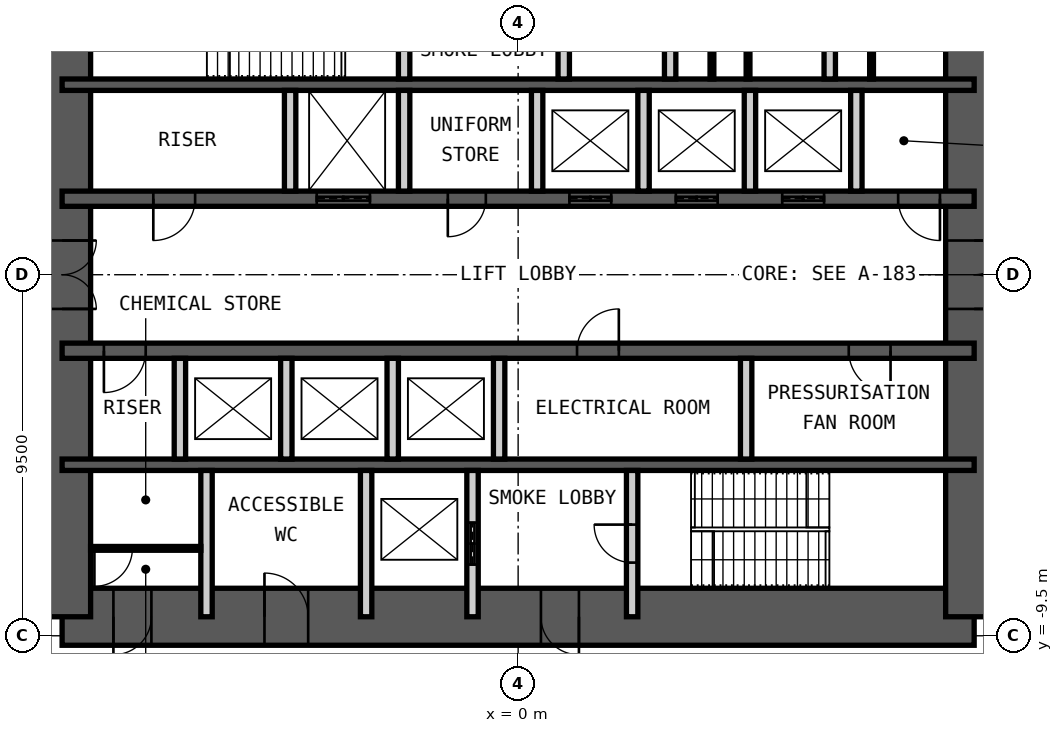
"""IFC4 building model, lengths in metres.
Left out: names, types, materials, properties, quantities, classifications, styles, units other than length and angle.
Written with IfcOpenShell. Run it as: python <this file> out.ifc"""

import sys

from ifc_helpers import new_model, si_unit, direction, frame, frame_2d, origin, place, context, subcontext, project, spatial, rectangle, extrude, element, fill, save


model = new_model("IFC4")
c1 = context("Model", 3, precision=1e-05, world=origin(), true_north=direction((0.0, 1.0)))
c2 = subcontext(c1, "Body", "Model", "MODEL_VIEW")
j1 = project(units=[si_unit("LENGTHUNIT", "METRE"), si_unit("PLANEANGLEUNIT", "RADIAN")], contexts=[c1])
p1 = place(None, origin())
s1 = spatial("IfcSite", under=j1, at=p1, CompositionType="ELEMENT")
p2 = place(p1, origin())
s2 = spatial("IfcBuilding", under=s1, at=p2, CompositionType="ELEMENT")
p3 = place(p2, frame((0.0, 0.0, 72.0)))
s3 = spatial("IfcBuildingStorey", under=s2, at=p3, CompositionType="ELEMENT", Elevation=72.0)
p4 = place(p3, frame((-12.0, -9.0, 0.0), z_axis=(0.0, 0.0, 1.0), x_axis=(1.0, 0.0, 0.0)))
e1 = element("IfcWall", 1, at=p4, inside=s3, PredefinedType="SHEAR", context=c2, shape_type="SweptSolid", body=[
    extrude(rectangle(XDim=24.0, YDim=1.5, at=frame_2d((12.0, 0.0))), origin(), (0.0, 0.0, 1.0), 5.0),
])
p5 = place(p4, frame((1.35, 0.0, 0.0)))
e2 = element("IfcOpeningElement", 2, at=p5, cuts=e1, PredefinedType="OPENING", context=c2, shape_type="SweptSolid", body=[
    extrude(rectangle(XDim=1.0, YDim=2.1, at=frame_2d((0.5, 1.05))), frame((0.0, 0.76, 0.0), z_axis=(0.0, -1.0, 0.0), x_axis=(1.0, 0.0, 0.0)), (0.0, 0.0, 1.0), 1.52),
])
p6 = place(p4, frame((5.325, 0.0, 0.0)))
e3 = element("IfcOpeningElement", 3, at=p6, cuts=e1, PredefinedType="OPENING", context=c2, shape_type="SweptSolid", body=[
    extrude(rectangle(XDim=1.15, YDim=2.1, at=frame_2d((0.575, 1.05))), frame((0.0, 0.76, 0.0), z_axis=(0.0, -1.0, 0.0), x_axis=(1.0, 0.0, 0.0)), (0.0, 0.0, 1.0), 1.52),
])
p7 = place(p4, frame((12.6, 0.0, 0.0)))
e4 = element("IfcOpeningElement", 4, at=p7, cuts=e1, PredefinedType="OPENING", context=c2, shape_type="SweptSolid", body=[
    extrude(rectangle(XDim=1.0, YDim=2.1, at=frame_2d((0.5, 1.05))), frame((0.0, 0.76, 0.0), z_axis=(0.0, -1.0, 0.0), x_axis=(1.0, 0.0, 0.0)), (0.0, 0.0, 1.0), 1.52),
])
p8 = place(p3, frame((12.0, -9.0, 0.0), z_axis=(0.0, 0.0, 1.0), x_axis=(0.0, 1.0, 0.0)))
e5 = element("IfcWall", 5, at=p8, inside=s3, PredefinedType="SHEAR", context=c2, shape_type="SweptSolid", body=[
    extrude(rectangle(XDim=18.0, YDim=1.5, at=frame_2d((9.0, 0.0))), origin(), (0.0, 0.0, 1.0), 5.0),
])
p9 = place(p8, frame((8.1, 0.0, 0.0)))
e6 = element("IfcOpeningElement", 6, at=p9, cuts=e5, PredefinedType="OPENING", context=c2, shape_type="SweptSolid", body=[
    extrude(rectangle(XDim=1.8, YDim=2.1, at=frame_2d((0.9, 1.05))), frame((0.0, 0.76, 0.0), z_axis=(0.0, -1.0, 0.0), x_axis=(1.0, 0.0, 0.0)), (0.0, 0.0, 1.0), 1.52),
])
p10 = place(p3, frame((-12.0, -9.0, 0.0), z_axis=(0.0, 0.0, 1.0), x_axis=(0.0, 1.0, 0.0)))
e7 = element("IfcWall", 7, at=p10, inside=s3, PredefinedType="SHEAR", context=c2, shape_type="SweptSolid", body=[
    extrude(rectangle(XDim=18.0, YDim=1.5, at=frame_2d((9.0, 0.0))), origin(), (0.0, 0.0, 1.0), 5.0),
])
p11 = place(p10, frame((8.1, 0.0, 0.0)))
e8 = element("IfcOpeningElement", 8, at=p11, cuts=e7, PredefinedType="OPENING", context=c2, shape_type="SweptSolid", body=[
    extrude(rectangle(XDim=1.8, YDim=2.1, at=frame_2d((0.9, 1.05))), frame((0.0, 0.76, 0.0), z_axis=(0.0, -1.0, 0.0), x_axis=(1.0, 0.0, 0.0)), (0.0, 0.0, 1.0), 1.52),
])
p12 = place(p3, frame((-12.0, 5.0, 0.0), z_axis=(0.0, 0.0, 1.0), x_axis=(1.0, 0.0, 0.0)))
e9 = element("IfcWall", 9, at=p12, inside=s3, PredefinedType="SHEAR", context=c2, shape_type="SweptSolid", body=[
    extrude(rectangle(XDim=24.0, YDim=0.3, at=frame_2d((12.0, 0.0))), origin(), (0.0, 0.0, 1.0), 5.0),
])
p13 = place(p3, frame((-12.0, 2.0, 0.0), z_axis=(0.0, 0.0, 1.0), x_axis=(1.0, 0.0, 0.0)))
e10 = element("IfcWall", 10, at=p13, inside=s3, PredefinedType="SHEAR", context=c2, shape_type="SweptSolid", body=[
    extrude(rectangle(XDim=24.0, YDim=0.4, at=frame_2d((12.0, 0.0))), origin(), (0.0, 0.0, 1.0), 5.0),
])
p14 = place(p13, frame((2.4, 0.0, 0.0)))
e11 = element("IfcOpeningElement", 11, at=p14, cuts=e10, PredefinedType="OPENING", context=c2, shape_type="SweptSolid", body=[
    extrude(rectangle(XDim=1.1, YDim=2.1, at=frame_2d((0.55, 1.05))), frame((0.0, 0.21, 0.0), z_axis=(0.0, -1.0, 0.0), x_axis=(1.0, 0.0, 0.0)), (0.0, 0.0, 1.0), 0.42),
])
p15 = place(p13, frame((22.0, 0.0, 0.0)))
e12 = element("IfcOpeningElement", 12, at=p15, cuts=e10, PredefinedType="OPENING", context=c2, shape_type="SweptSolid", body=[
    extrude(rectangle(XDim=1.1, YDim=2.1, at=frame_2d((0.55, 1.05))), frame((0.0, 0.21, 0.0), z_axis=(0.0, -1.0, 0.0), x_axis=(1.0, 0.0, 0.0)), (0.0, 0.0, 1.0), 0.42),
])
p16 = place(p13, frame((10.15, 0.0, 0.0)))
e13 = element("IfcOpeningElement", 13, at=p16, cuts=e10, PredefinedType="OPENING", context=c2, shape_type="SweptSolid", body=[
    extrude(rectangle(XDim=1.0, YDim=2.1, at=frame_2d((0.5, 1.05))), frame((0.0, 0.21, 0.0), z_axis=(0.0, -1.0, 0.0), x_axis=(1.0, 0.0, 0.0)), (0.0, 0.0, 1.0), 0.42),
])
p17 = place(p13, frame((6.7, 0.0, 0.0)))
e14 = element("IfcOpeningElement", 14, at=p17, cuts=e10, PredefinedType="OPENING", context=c2, shape_type="SweptSolid", body=[
    extrude(rectangle(XDim=1.4, YDim=2.4, at=frame_2d((0.7, 1.2))), frame((0.0, 0.21, 0.0), z_axis=(0.0, -1.0, 0.0), x_axis=(1.0, 0.0, 0.0)), (0.0, 0.0, 1.0), 0.42),
])
p18 = place(p13, frame((13.35, 0.0, 0.0)))
e15 = element("IfcOpeningElement", 15, at=p18, cuts=e10, PredefinedType="OPENING", context=c2, shape_type="SweptSolid", body=[
    extrude(rectangle(XDim=1.1, YDim=2.4, at=frame_2d((0.55, 1.2))), frame((0.0, 0.21, 0.0), z_axis=(0.0, -1.0, 0.0), x_axis=(1.0, 0.0, 0.0)), (0.0, 0.0, 1.0), 0.42),
])
p19 = place(p13, frame((16.15, 0.0, 0.0)))
e16 = element("IfcOpeningElement", 16, at=p19, cuts=e10, PredefinedType="OPENING", context=c2, shape_type="SweptSolid", body=[
    extrude(rectangle(XDim=1.1, YDim=2.4, at=frame_2d((0.55, 1.2))), frame((0.0, 0.21, 0.0), z_axis=(0.0, -1.0, 0.0), x_axis=(1.0, 0.0, 0.0)), (0.0, 0.0, 1.0), 0.42),
])
p20 = place(p13, frame((18.95, 0.0, 0.0)))
e17 = element("IfcOpeningElement", 17, at=p20, cuts=e10, PredefinedType="OPENING", context=c2, shape_type="SweptSolid", body=[
    extrude(rectangle(XDim=1.1, YDim=2.4, at=frame_2d((0.55, 1.2))), frame((0.0, 0.21, 0.0), z_axis=(0.0, -1.0, 0.0), x_axis=(1.0, 0.0, 0.0)), (0.0, 0.0, 1.0), 0.42),
])
p21 = place(p3, frame((-12.0, -2.0, 0.0), z_axis=(0.0, 0.0, 1.0), x_axis=(1.0, 0.0, 0.0)))
e18 = element("IfcWall", 18, at=p21, inside=s3, PredefinedType="SHEAR", context=c2, shape_type="SweptSolid", body=[
    extrude(rectangle(XDim=24.0, YDim=0.4, at=frame_2d((12.0, 0.0))), origin(), (0.0, 0.0, 1.0), 5.0),
])
p22 = place(p21, frame((1.1, 0.0, 0.0)))
e19 = element("IfcOpeningElement", 19, at=p22, cuts=e18, PredefinedType="OPENING", context=c2, shape_type="SweptSolid", body=[
    extrude(rectangle(XDim=1.1, YDim=2.1, at=frame_2d((0.55, 1.05))), frame((0.0, 0.21, 0.0), z_axis=(0.0, -1.0, 0.0), x_axis=(1.0, 0.0, 0.0)), (0.0, 0.0, 1.0), 0.42),
])
p23 = place(p21, frame((13.55, 0.0, 0.0)))
e20 = element("IfcOpeningElement", 20, at=p23, cuts=e18, PredefinedType="OPENING", context=c2, shape_type="SweptSolid", body=[
    extrude(rectangle(XDim=1.1, YDim=2.1, at=frame_2d((0.55, 1.05))), frame((0.0, 0.21, 0.0), z_axis=(0.0, -1.0, 0.0), x_axis=(1.0, 0.0, 0.0)), (0.0, 0.0, 1.0), 0.42),
])
p24 = place(p21, frame((20.7, 0.0, 0.0)))
e21 = element("IfcOpeningElement", 21, at=p24, cuts=e18, PredefinedType="OPENING", context=c2, shape_type="SweptSolid", body=[
    extrude(rectangle(XDim=1.1, YDim=2.1, at=frame_2d((0.55, 1.05))), frame((0.0, 0.21, 0.0), z_axis=(0.0, -1.0, 0.0), x_axis=(1.0, 0.0, 0.0)), (0.0, 0.0, 1.0), 0.42),
])
p25 = place(p3, frame((-12.0, -5.0, 0.0), z_axis=(0.0, 0.0, 1.0), x_axis=(1.0, 0.0, 0.0)))
e22 = element("IfcWall", 22, at=p25, inside=s3, PredefinedType="SHEAR", context=c2, shape_type="SweptSolid", body=[
    extrude(rectangle(XDim=24.0, YDim=0.3, at=frame_2d((12.0, 0.0))), origin(), (0.0, 0.0, 1.0), 5.0),
])
p26 = place(p3, frame((-3.0, 5.15, 0.0), z_axis=(0.0, 0.0, 1.0), x_axis=(0.0, 1.0, 0.0)))
e23 = element("IfcWall", 23, at=p26, inside=s3, PredefinedType="PARTITIONING", context=c2, shape_type="SweptSolid", body=[
    extrude(rectangle(XDim=3.85, YDim=0.3, at=frame_2d((1.925, 0.0))), origin(), (0.0, 0.0, 1.0), 4.78),
])
p27 = place(p26, frame((1.425, 0.0, 0.0)))
e24 = element("IfcOpeningElement", 24, at=p27, cuts=e23, PredefinedType="OPENING", context=c2, shape_type="SweptSolid", body=[
    extrude(rectangle(XDim=1.0, YDim=2.1, at=frame_2d((0.5, 1.05))), frame((0.0, 0.16, 0.0), z_axis=(0.0, -1.0, 0.0), x_axis=(1.0, 0.0, 0.0)), (0.0, 0.0, 1.0), 0.32),
])
p28 = place(p3, frame((1.2, 5.15, 0.0), z_axis=(0.0, 0.0, 1.0), x_axis=(0.0, 1.0, 0.0)))
e25 = element("IfcWall", 25, at=p28, inside=s3, PredefinedType="PARTITIONING", context=c2, shape_type="SweptSolid", body=[
    extrude(rectangle(XDim=3.85, YDim=0.3, at=frame_2d((1.925, 0.0))), origin(), (0.0, 0.0, 1.0), 4.78),
])
p29 = place(p28, frame((1.375, 0.0, 0.0)))
e26 = element("IfcOpeningElement", 26, at=p29, cuts=e25, PredefinedType="OPENING", context=c2, shape_type="SweptSolid", body=[
    extrude(rectangle(XDim=1.1, YDim=2.4, at=frame_2d((0.55, 1.2))), frame((0.0, 0.16, 0.0), z_axis=(0.0, -1.0, 0.0), x_axis=(1.0, 0.0, 0.0)), (0.0, 0.0, 1.0), 0.32),
])
for number, where, z_axis, x_axis in (
    (27, (4.0, 5.15, 0.0), (0.0, 0.0, 1.0), (0.0, 1.0, 0.0)),
    (28, (8.2, 5.15, 0.0), (0.0, 0.0, 1.0), (0.0, 1.0, 0.0)),
):
    element("IfcWall", number, at=place(p3, frame(where, z_axis=z_axis, x_axis=x_axis)), inside=s3, PredefinedType="PARTITIONING", context=c2, shape_type="SweptSolid", body=[
        extrude(rectangle(XDim=3.85, YDim=0.3, at=frame_2d((1.925, 0.0))), origin(), (0.0, 0.0, 1.0), 4.78),
    ])
for number, where, z_axis, x_axis in (
    (29, (-6.0, 2.2, 0.0), (0.0, 0.0, 1.0), (0.0, 1.0, 0.0)),
    (30, (-3.0, 2.2, 0.0), (0.0, 0.0, 1.0), (0.0, 1.0, 0.0)),
    (31, (0.5, 2.2, 0.0), (0.0, 0.0, 1.0), (0.0, 1.0, 0.0)),
    (32, (3.3, 2.2, 0.0), (0.0, 0.0, 1.0), (0.0, 1.0, 0.0)),
    (33, (6.1, 2.2, 0.0), (0.0, 0.0, 1.0), (0.0, 1.0, 0.0)),
    (34, (8.9, 2.2, 0.0), (0.0, 0.0, 1.0), (0.0, 1.0, 0.0)),
    (35, (-8.9, -4.85, 0.0), (0.0, 0.0, 1.0), (0.0, 1.0, 0.0)),
    (36, (-6.1, -4.85, 0.0), (0.0, 0.0, 1.0), (0.0, 1.0, 0.0)),
    (37, (-3.3, -4.85, 0.0), (0.0, 0.0, 1.0), (0.0, 1.0, 0.0)),
    (38, (-0.5, -4.85, 0.0), (0.0, 0.0, 1.0), (0.0, 1.0, 0.0)),
    (39, (6.0, -4.85, 0.0), (0.0, 0.0, 1.0), (0.0, 1.0, 0.0)),
):
    element("IfcWall", number, at=place(p3, frame(where, z_axis=z_axis, x_axis=x_axis)), inside=s3, PredefinedType="PARTITIONING", context=c2, shape_type="SweptSolid", body=[
        extrude(rectangle(XDim=2.65, YDim=0.3, at=frame_2d((1.325, 0.0))), origin(), (0.0, 0.0, 1.0), 4.78),
    ])
for number, where, z_axis, x_axis in (
    (40, (-8.2, -9.0, 0.0), (0.0, 0.0, 1.0), (0.0, 1.0, 0.0)),
    (41, (-4.0, -9.0, 0.0), (0.0, 0.0, 1.0), (0.0, 1.0, 0.0)),
):
    element("IfcWall", number, at=place(p3, frame(where, z_axis=z_axis, x_axis=x_axis)), inside=s3, PredefinedType="PARTITIONING", context=c2, shape_type="SweptSolid", body=[
        extrude(rectangle(XDim=3.85, YDim=0.3, at=frame_2d((1.925, 0.0))), origin(), (0.0, 0.0, 1.0), 4.78),
    ])
p30 = place(p3, frame((-1.2, -9.0, 0.0), z_axis=(0.0, 0.0, 1.0), x_axis=(0.0, 1.0, 0.0)))
e42 = element("IfcWall", 42, at=p30, inside=s3, PredefinedType="PARTITIONING", context=c2, shape_type="SweptSolid", body=[
    extrude(rectangle(XDim=3.85, YDim=0.3, at=frame_2d((1.925, 0.0))), origin(), (0.0, 0.0, 1.0), 4.78),
])
p31 = place(p30, frame((1.375, 0.0, 0.0)))
e43 = element("IfcOpeningElement", 43, at=p31, cuts=e42, PredefinedType="OPENING", context=c2, shape_type="SweptSolid", body=[
    extrude(rectangle(XDim=1.1, YDim=2.4, at=frame_2d((0.55, 1.2))), frame((0.0, 0.16, 0.0), z_axis=(0.0, -1.0, 0.0), x_axis=(1.0, 0.0, 0.0)), (0.0, 0.0, 1.0), 0.32),
])
p32 = place(p3, frame((3.0, -9.0, 0.0), z_axis=(0.0, 0.0, 1.0), x_axis=(0.0, 1.0, 0.0)))
e44 = element("IfcWall", 44, at=p32, inside=s3, PredefinedType="PARTITIONING", context=c2, shape_type="SweptSolid", body=[
    extrude(rectangle(XDim=3.85, YDim=0.3, at=frame_2d((1.925, 0.0))), origin(), (0.0, 0.0, 1.0), 4.78),
])
p33 = place(p32, frame((1.425, 0.0, 0.0)))
e45 = element("IfcOpeningElement", 45, at=p33, cuts=e44, PredefinedType="OPENING", context=c2, shape_type="SweptSolid", body=[
    extrude(rectangle(XDim=1.0, YDim=2.1, at=frame_2d((0.5, 1.05))), frame((0.0, 0.16, 0.0), z_axis=(0.0, -1.0, 0.0), x_axis=(1.0, 0.0, 0.0)), (0.0, 0.0, 1.0), 0.32),
])
p34 = place(p3, frame((-11.25, -7.2, 0.0), z_axis=(0.0, 0.0, 1.0), x_axis=(1.0, 0.0, 0.0)))
e46 = element("IfcWall", 46, at=p34, inside=s3, PredefinedType="PARTITIONING", context=c2, shape_type="SweptSolid", body=[
    extrude(rectangle(XDim=2.9, YDim=0.1, at=frame_2d((1.45, 0.0))), origin(), (0.0, 0.0, 1.0), 4.78),
])
p35 = place(p34, frame((0.1, 0.0, 0.0)))
e47 = element("IfcOpeningElement", 47, at=p35, cuts=e46, PredefinedType="OPENING", context=c2, shape_type="SweptSolid", body=[
    extrude(rectangle(XDim=1.0, YDim=2.4, at=frame_2d((0.5, 1.2))), frame((0.0, 0.06, 0.0), z_axis=(0.0, -1.0, 0.0), x_axis=(1.0, 0.0, 0.0)), (0.0, 0.0, 1.0), 0.12),
])
for number, where, z_axis, x_axis in (
    (48, (5.1, 5.15, 0.0), (0.0, 0.0, 1.0), (0.0, 1.0, 0.0)),
    (49, (6.05, 5.15, 0.0), (0.0, 0.0, 1.0), (0.0, 1.0, 0.0)),
    (50, (9.3, 5.15, 0.0), (0.0, 0.0, 1.0), (0.0, 1.0, 0.0)),
):
    element("IfcWall", number, at=place(p3, frame(where, z_axis=z_axis, x_axis=x_axis)), inside=s3, PredefinedType="PARTITIONING", context=c2, shape_type="SweptSolid", body=[
        extrude(rectangle(XDim=1.5, YDim=0.1, at=frame_2d((0.75, 0.0))), origin(), (0.0, 0.0, 1.0), 2.1),
    ])
p36 = place(p5, origin())
e51 = element("IfcDoor", 51, at=p36, inside=s3, OperationType="SINGLE_SWING_LEFT", PredefinedType="DOOR", context=c2, shape_type="SweptSolid", body=[
    extrude(rectangle(XDim=1.0, YDim=2.1, at=frame_2d((0.5, 1.05))), frame((0.0, 0.025, 0.0), z_axis=(0.0, -1.0, 0.0), x_axis=(1.0, 0.0, 0.0)), (0.0, 0.0, 1.0), 0.05),
])
fill(e2, e51)
p37 = place(p6, origin())
e52 = element("IfcDoor", 52, at=p37, inside=s3, OperationType="SINGLE_SWING_RIGHT", PredefinedType="DOOR", context=c2, shape_type="SweptSolid", body=[
    extrude(rectangle(XDim=1.15, YDim=2.1, at=frame_2d((0.575, 1.05))), frame((0.0, 0.025, 0.0), z_axis=(0.0, -1.0, 0.0), x_axis=(1.0, 0.0, 0.0)), (0.0, 0.0, 1.0), 0.05),
])
fill(e3, e52)
p38 = place(p7, origin())
e53 = element("IfcDoor", 53, at=p38, inside=s3, OperationType="SINGLE_SWING_RIGHT", PredefinedType="DOOR", context=c2, shape_type="SweptSolid", body=[
    extrude(rectangle(XDim=1.0, YDim=2.1, at=frame_2d((0.5, 1.05))), frame((0.0, 0.025, 0.0), z_axis=(0.0, -1.0, 0.0), x_axis=(1.0, 0.0, 0.0)), (0.0, 0.0, 1.0), 0.05),
])
fill(e4, e53)
p39 = place(p33, origin())
e54 = element("IfcDoor", 54, at=p39, inside=s3, OperationType="SINGLE_SWING_LEFT", PredefinedType="DOOR", context=c2, shape_type="SweptSolid", body=[
    extrude(rectangle(XDim=1.0, YDim=2.1, at=frame_2d((0.5, 1.05))), frame((0.0, 0.025, 0.0), z_axis=(0.0, -1.0, 0.0), x_axis=(1.0, 0.0, 0.0)), (0.0, 0.0, 1.0), 0.05),
])
fill(e45, e54)
p40 = place(p14, origin())
e55 = element("IfcDoor", 55, at=p40, inside=s3, OperationType="SINGLE_SWING_LEFT", PredefinedType="DOOR", context=c2, shape_type="SweptSolid", body=[
    extrude(rectangle(XDim=1.1, YDim=2.1, at=frame_2d((0.55, 1.05))), frame((0.0, 0.025, 0.0), z_axis=(0.0, -1.0, 0.0), x_axis=(1.0, 0.0, 0.0)), (0.0, 0.0, 1.0), 0.05),
])
fill(e11, e55)
p41 = place(p22, origin())
e56 = element("IfcDoor", 56, at=p41, inside=s3, OperationType="SINGLE_SWING_LEFT", PredefinedType="DOOR", context=c2, shape_type="SweptSolid", body=[
    extrude(rectangle(XDim=1.1, YDim=2.1, at=frame_2d((0.55, 1.05))), frame((0.0, 0.025, 0.0), z_axis=(0.0, -1.0, 0.0), x_axis=(1.0, 0.0, 0.0)), (0.0, 0.0, 1.0), 0.05),
])
fill(e19, e56)
p42 = place(p15, origin())
e57 = element("IfcDoor", 57, at=p42, inside=s3, OperationType="SINGLE_SWING_RIGHT", PredefinedType="DOOR", context=c2, shape_type="SweptSolid", body=[
    extrude(rectangle(XDim=1.1, YDim=2.1, at=frame_2d((0.55, 1.05))), frame((0.0, 0.025, 0.0), z_axis=(0.0, -1.0, 0.0), x_axis=(1.0, 0.0, 0.0)), (0.0, 0.0, 1.0), 0.05),
])
fill(e12, e57)
p43 = place(p16, origin())
e58 = element("IfcDoor", 58, at=p43, inside=s3, OperationType="SINGLE_SWING_LEFT", PredefinedType="DOOR", context=c2, shape_type="SweptSolid", body=[
    extrude(rectangle(XDim=1.0, YDim=2.1, at=frame_2d((0.5, 1.05))), frame((0.0, 0.025, 0.0), z_axis=(0.0, -1.0, 0.0), x_axis=(1.0, 0.0, 0.0)), (0.0, 0.0, 1.0), 0.05),
])
fill(e13, e58)
p44 = place(p23, origin())
e59 = element("IfcDoor", 59, at=p44, inside=s3, OperationType="SINGLE_SWING_LEFT", PredefinedType="DOOR", context=c2, shape_type="SweptSolid", body=[
    extrude(rectangle(XDim=1.1, YDim=2.1, at=frame_2d((0.55, 1.05))), frame((0.0, 0.025, 0.0), z_axis=(0.0, -1.0, 0.0), x_axis=(1.0, 0.0, 0.0)), (0.0, 0.0, 1.0), 0.05),
])
fill(e20, e59)
p45 = place(p24, origin())
e60 = element("IfcDoor", 60, at=p45, inside=s3, OperationType="SINGLE_SWING_RIGHT", PredefinedType="DOOR", context=c2, shape_type="SweptSolid", body=[
    extrude(rectangle(XDim=1.1, YDim=2.1, at=frame_2d((0.55, 1.05))), frame((0.0, 0.025, 0.0), z_axis=(0.0, -1.0, 0.0), x_axis=(1.0, 0.0, 0.0)), (0.0, 0.0, 1.0), 0.05),
])
fill(e21, e60)
p46 = place(p9, origin())
e61 = element("IfcDoor", 61, at=p46, inside=s3, OperationType="DOUBLE_DOOR_DOUBLE_SWING", PredefinedType="DOOR", context=c2, shape_type="SweptSolid", body=[
    extrude(rectangle(XDim=1.8, YDim=2.1, at=frame_2d((0.9, 1.05))), frame((0.0, 0.025, 0.0), z_axis=(0.0, -1.0, 0.0), x_axis=(1.0, 0.0, 0.0)), (0.0, 0.0, 1.0), 0.05),
])
fill(e6, e61)
p47 = place(p11, origin())
e62 = element("IfcDoor", 62, at=p47, inside=s3, OperationType="DOUBLE_DOOR_DOUBLE_SWING", PredefinedType="DOOR", context=c2, shape_type="SweptSolid", body=[
    extrude(rectangle(XDim=1.8, YDim=2.1, at=frame_2d((0.9, 1.05))), frame((0.0, 0.025, 0.0), z_axis=(0.0, -1.0, 0.0), x_axis=(1.0, 0.0, 0.0)), (0.0, 0.0, 1.0), 0.05),
])
fill(e8, e62)
p48 = place(p31, origin())
e63 = element("IfcDoor", 63, at=p48, inside=s3, OperationType="DOUBLE_DOOR_SLIDING", PredefinedType="DOOR", context=c2, shape_type="SweptSolid", body=[
    extrude(rectangle(XDim=1.1, YDim=2.4, at=frame_2d((0.55, 1.2))), frame((0.0, 0.025, 0.0), z_axis=(0.0, -1.0, 0.0), x_axis=(1.0, 0.0, 0.0)), (0.0, 0.0, 1.0), 0.05),
])
fill(e43, e63)
p49 = place(p17, origin())
e64 = element("IfcDoor", 64, at=p49, inside=s3, OperationType="DOUBLE_DOOR_SLIDING", PredefinedType="DOOR", context=c2, shape_type="SweptSolid", body=[
    extrude(rectangle(XDim=1.4, YDim=2.4, at=frame_2d((0.7, 1.2))), frame((0.0, 0.025, 0.0), z_axis=(0.0, -1.0, 0.0), x_axis=(1.0, 0.0, 0.0)), (0.0, 0.0, 1.0), 0.05),
])
fill(e14, e64)
p50 = place(p18, origin())
e65 = element("IfcDoor", 65, at=p50, inside=s3, OperationType="DOUBLE_DOOR_SLIDING", PredefinedType="DOOR", context=c2, shape_type="SweptSolid", body=[
    extrude(rectangle(XDim=1.1, YDim=2.4, at=frame_2d((0.55, 1.2))), frame((0.0, 0.025, 0.0), z_axis=(0.0, -1.0, 0.0), x_axis=(1.0, 0.0, 0.0)), (0.0, 0.0, 1.0), 0.05),
])
fill(e15, e65)
p51 = place(p19, origin())
e66 = element("IfcDoor", 66, at=p51, inside=s3, OperationType="DOUBLE_DOOR_SLIDING", PredefinedType="DOOR", context=c2, shape_type="SweptSolid", body=[
    extrude(rectangle(XDim=1.1, YDim=2.4, at=frame_2d((0.55, 1.2))), frame((0.0, 0.025, 0.0), z_axis=(0.0, -1.0, 0.0), x_axis=(1.0, 0.0, 0.0)), (0.0, 0.0, 1.0), 0.05),
])
fill(e16, e66)
p52 = place(p20, origin())
e67 = element("IfcDoor", 67, at=p52, inside=s3, OperationType="DOUBLE_DOOR_SLIDING", PredefinedType="DOOR", context=c2, shape_type="SweptSolid", body=[
    extrude(rectangle(XDim=1.1, YDim=2.4, at=frame_2d((0.55, 1.2))), frame((0.0, 0.025, 0.0), z_axis=(0.0, -1.0, 0.0), x_axis=(1.0, 0.0, 0.0)), (0.0, 0.0, 1.0), 0.05),
])
fill(e17, e67)
p53 = place(p35, origin())
e68 = element("IfcDoor", 68, at=p53, inside=s3, OperationType="SINGLE_SWING_LEFT", PredefinedType="DOOR", context=c2, shape_type="SweptSolid", body=[
    extrude(rectangle(XDim=1.0, YDim=2.4, at=frame_2d((0.5, 1.2))), frame((0.0, 0.025, 0.0), z_axis=(0.0, -1.0, 0.0), x_axis=(1.0, 0.0, 0.0)), (0.0, 0.0, 1.0), 0.05),
])
fill(e47, e68)
save(model, sys.argv[1])
